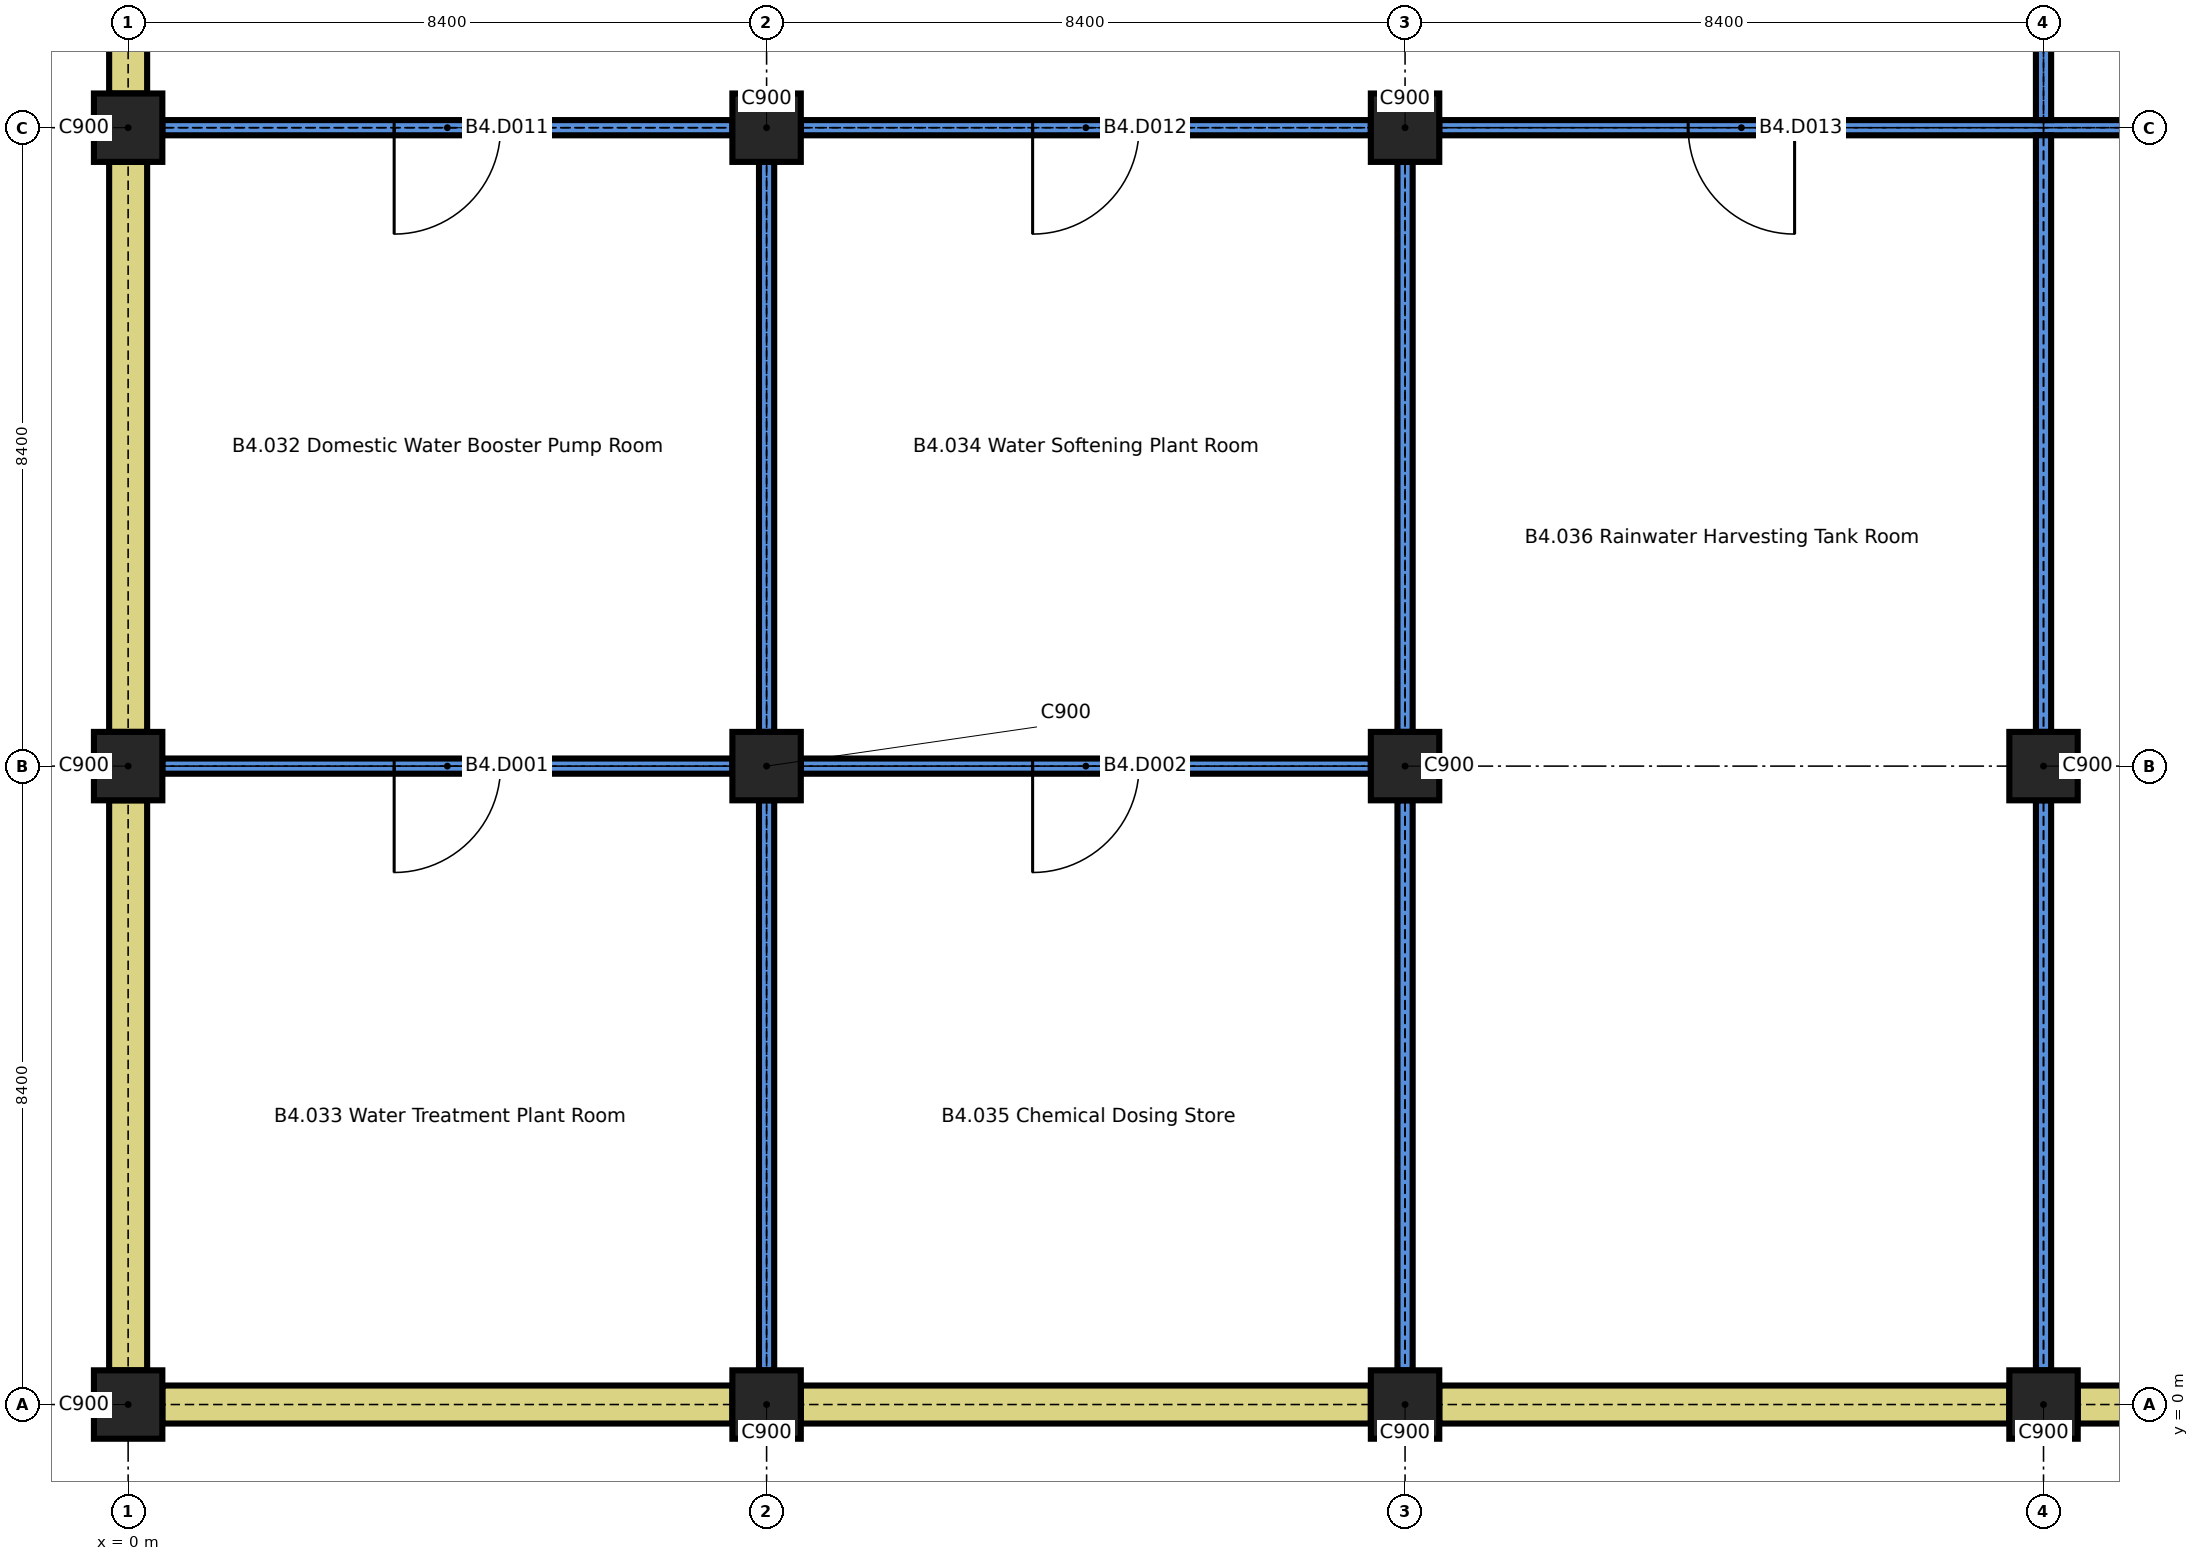
"""IFC4 building model, lengths in metres.
Left out: names, types, materials, properties, quantities, classifications, styles, units other than length and angle.
Written with IfcOpenShell. Run it as: python <this file> out.ifc"""

import sys

from ifc_helpers import new_model, si_unit, direction, frame, frame_2d, origin, origin_2d, place, context, subcontext, project, spatial, rectangle, extrude, element, fill, save


model = new_model("IFC4")
c1 = context("Model", 3, precision=1e-05, world=origin(), true_north=direction((0.0, 1.0)))
c2 = subcontext(c1, "Body", "Model", "MODEL_VIEW")
j1 = project(units=[si_unit("LENGTHUNIT", "METRE"), si_unit("PLANEANGLEUNIT", "RADIAN")], contexts=[c1])
p1 = place(None, origin())
s1 = spatial("IfcSite", under=j1, at=p1, CompositionType="ELEMENT")
p2 = place(p1, origin())
s2 = spatial("IfcBuilding", under=s1, at=p2, CompositionType="ELEMENT")
p3 = place(p2, frame((0.0, 0.0, -15.0)))
s3 = spatial("IfcBuildingStorey", under=s2, at=p3, CompositionType="ELEMENT", Elevation=-15.0)
for number, where, z_axis, x_axis in (
    (1, (0.0, 0.0, 0.0), (0.0, 0.0, 1.0), (1.0, 0.0, 0.0)),
    (2, (8.4, 0.0, 0.0), (0.0, 0.0, 1.0), (1.0, 0.0, 0.0)),
    (3, (16.8, 0.0, 0.0), (0.0, 0.0, 1.0), (1.0, 0.0, 0.0)),
    (4, (25.2, 0.0, 0.0), (0.0, 0.0, 1.0), (1.0, 0.0, 0.0)),
    (5, (0.0, 8.4, 0.0), (0.0, 0.0, 1.0), (1.0, 0.0, 0.0)),
    (6, (8.4, 8.4, 0.0), (0.0, 0.0, 1.0), (1.0, 0.0, 0.0)),
    (7, (16.8, 8.4, 0.0), (0.0, 0.0, 1.0), (1.0, 0.0, 0.0)),
    (8, (25.2, 8.4, 0.0), (0.0, 0.0, 1.0), (1.0, 0.0, 0.0)),
    (9, (0.0, 16.8, 0.0), (0.0, 0.0, 1.0), (1.0, 0.0, 0.0)),
    (10, (8.4, 16.8, 0.0), (0.0, 0.0, 1.0), (1.0, 0.0, 0.0)),
    (11, (16.8, 16.8, 0.0), (0.0, 0.0, 1.0), (1.0, 0.0, 0.0)),
):
    element("IfcColumn", number, at=place(p3, frame(where, z_axis=z_axis, x_axis=x_axis)), inside=s3, PredefinedType="COLUMN", context=c2, shape_type="SweptSolid", body=[
        extrude(rectangle(XDim=0.9, YDim=0.9, at=origin_2d()), origin(), (0.0, 0.0, 1.0), 3.2),
    ])
for number, where, z_axis, x_axis in (
    (12, (0.45, 0.0, 0.0), (0.0, 0.0, 1.0), (1.0, 0.0, 0.0)),
    (13, (8.85, 0.0, 0.0), (0.0, 0.0, 1.0), (1.0, 0.0, 0.0)),
    (14, (17.25, 0.0, 0.0), (0.0, 0.0, 1.0), (1.0, 0.0, 0.0)),
    (15, (25.65, 0.0, 0.0), (0.0, 0.0, 1.0), (1.0, 0.0, 0.0)),
    (16, (0.0, 0.45, 0.0), (0.0, 0.0, 1.0), (0.0, 1.0, 0.0)),
    (17, (0.0, 8.85, 0.0), (0.0, 0.0, 1.0), (0.0, 1.0, 0.0)),
):
    element("IfcWall", number, at=place(p3, frame(where, z_axis=z_axis, x_axis=x_axis)), inside=s3, PredefinedType="SOLIDWALL", context=c2, shape_type="SweptSolid", body=[
        extrude(rectangle(XDim=7.5, YDim=0.5, at=frame_2d((3.75, 0.0))), origin(), (0.0, 0.0, 1.0), 3.2),
    ])
p4 = place(p3, frame((0.0, 17.25, 0.0), z_axis=(0.0, 0.0, 1.0), x_axis=(0.0, 1.0, 0.0)))
e18 = element("IfcWall", 18, at=p4, inside=s3, PredefinedType="SOLIDWALL", context=c2, shape_type="SweptSolid", body=[
    extrude(rectangle(XDim=16.6, YDim=0.5, at=frame_2d((8.3, 0.0))), origin(), (0.0, 0.0, 1.0), 3.2),
])
p5 = place(p3, frame((0.45, 8.4, 0.0), z_axis=(0.0, 0.0, 1.0), x_axis=(1.0, 0.0, 0.0)))
e19 = element("IfcWall", 19, at=p5, inside=s3, PredefinedType="PARTITIONING", context=c2, shape_type="SweptSolid", body=[
    extrude(rectangle(XDim=7.5, YDim=0.2, at=frame_2d((3.75, 0.0))), origin(), (0.0, 0.0, 1.0), 3.2),
])
p6 = place(p5, frame((3.05, 0.0, 0.0)))
e20 = element("IfcOpeningElement", 20, at=p6, cuts=e19, PredefinedType="OPENING", context=c2, shape_type="SweptSolid", body=[
    extrude(rectangle(XDim=1.4, YDim=2.1, at=frame_2d((0.7, 1.05))), frame((0.0, 0.11, 0.0), z_axis=(0.0, -1.0, 0.0), x_axis=(1.0, 0.0, 0.0)), (0.0, 0.0, 1.0), 0.22),
])
p7 = place(p3, frame((8.85, 8.4, 0.0), z_axis=(0.0, 0.0, 1.0), x_axis=(1.0, 0.0, 0.0)))
e21 = element("IfcWall", 21, at=p7, inside=s3, PredefinedType="PARTITIONING", context=c2, shape_type="SweptSolid", body=[
    extrude(rectangle(XDim=7.5, YDim=0.2, at=frame_2d((3.75, 0.0))), origin(), (0.0, 0.0, 1.0), 3.2),
])
p8 = place(p7, frame((3.05, 0.0, 0.0)))
e22 = element("IfcOpeningElement", 22, at=p8, cuts=e21, PredefinedType="OPENING", context=c2, shape_type="SweptSolid", body=[
    extrude(rectangle(XDim=1.4, YDim=2.1, at=frame_2d((0.7, 1.05))), frame((0.0, 0.11, 0.0), z_axis=(0.0, -1.0, 0.0), x_axis=(1.0, 0.0, 0.0)), (0.0, 0.0, 1.0), 0.22),
])
p9 = place(p3, frame((0.45, 16.8, 0.0), z_axis=(0.0, 0.0, 1.0), x_axis=(1.0, 0.0, 0.0)))
e23 = element("IfcWall", 23, at=p9, inside=s3, PredefinedType="PARTITIONING", context=c2, shape_type="SweptSolid", body=[
    extrude(rectangle(XDim=7.5, YDim=0.2, at=frame_2d((3.75, 0.0))), origin(), (0.0, 0.0, 1.0), 3.2),
])
p10 = place(p9, frame((3.05, 0.0, 0.0)))
e24 = element("IfcOpeningElement", 24, at=p10, cuts=e23, PredefinedType="OPENING", context=c2, shape_type="SweptSolid", body=[
    extrude(rectangle(XDim=1.4, YDim=2.1, at=frame_2d((0.7, 1.05))), frame((0.0, 0.11, 0.0), z_axis=(0.0, -1.0, 0.0), x_axis=(1.0, 0.0, 0.0)), (0.0, 0.0, 1.0), 0.22),
])
p11 = place(p3, frame((8.85, 16.8, 0.0), z_axis=(0.0, 0.0, 1.0), x_axis=(1.0, 0.0, 0.0)))
e25 = element("IfcWall", 25, at=p11, inside=s3, PredefinedType="PARTITIONING", context=c2, shape_type="SweptSolid", body=[
    extrude(rectangle(XDim=7.5, YDim=0.2, at=frame_2d((3.75, 0.0))), origin(), (0.0, 0.0, 1.0), 3.2),
])
p12 = place(p11, frame((3.05, 0.0, 0.0)))
e26 = element("IfcOpeningElement", 26, at=p12, cuts=e25, PredefinedType="OPENING", context=c2, shape_type="SweptSolid", body=[
    extrude(rectangle(XDim=1.4, YDim=2.1, at=frame_2d((0.7, 1.05))), frame((0.0, 0.11, 0.0), z_axis=(0.0, -1.0, 0.0), x_axis=(1.0, 0.0, 0.0)), (0.0, 0.0, 1.0), 0.22),
])
p13 = place(p3, frame((17.25, 16.8, 0.0), z_axis=(0.0, 0.0, 1.0), x_axis=(1.0, 0.0, 0.0)))
e27 = element("IfcWall", 27, at=p13, inside=s3, PredefinedType="PARTITIONING", context=c2, shape_type="SweptSolid", body=[
    extrude(rectangle(XDim=15.9, YDim=0.2, at=frame_2d((7.95, 0.0))), origin(), (0.0, 0.0, 1.0), 3.2),
])
p14 = place(p13, frame((3.275, 0.0, 0.0)))
e28 = element("IfcOpeningElement", 28, at=p14, cuts=e27, PredefinedType="OPENING", context=c2, shape_type="SweptSolid", body=[
    extrude(rectangle(XDim=1.4, YDim=2.1, at=frame_2d((0.7, 1.05))), frame((0.0, 0.11, 0.0), z_axis=(0.0, -1.0, 0.0), x_axis=(1.0, 0.0, 0.0)), (0.0, 0.0, 1.0), 0.22),
])
p15 = place(p13, frame((13.325, 0.0, 0.0)))
e29 = element("IfcOpeningElement", 29, at=p15, cuts=e27, PredefinedType="OPENING", context=c2, shape_type="SweptSolid", body=[
    extrude(rectangle(XDim=1.4, YDim=2.1, at=frame_2d((0.7, 1.05))), frame((0.0, 0.11, 0.0), z_axis=(0.0, -1.0, 0.0), x_axis=(1.0, 0.0, 0.0)), (0.0, 0.0, 1.0), 0.22),
])
for number, where, z_axis, x_axis in (
    (30, (8.4, 0.45, 0.0), (0.0, 0.0, 1.0), (0.0, 1.0, 0.0)),
    (31, (8.4, 8.85, 0.0), (0.0, 0.0, 1.0), (0.0, 1.0, 0.0)),
    (32, (16.8, 0.45, 0.0), (0.0, 0.0, 1.0), (0.0, 1.0, 0.0)),
    (33, (16.8, 8.85, 0.0), (0.0, 0.0, 1.0), (0.0, 1.0, 0.0)),
    (34, (25.2, 0.45, 0.0), (0.0, 0.0, 1.0), (0.0, 1.0, 0.0)),
):
    element("IfcWall", number, at=place(p3, frame(where, z_axis=z_axis, x_axis=x_axis)), inside=s3, PredefinedType="PARTITIONING", context=c2, shape_type="SweptSolid", body=[
        extrude(rectangle(XDim=7.5, YDim=0.2, at=frame_2d((3.75, 0.0))), origin(), (0.0, 0.0, 1.0), 3.2),
    ])
p16 = place(p3, frame((25.2, 8.85, 0.0), z_axis=(0.0, 0.0, 1.0), x_axis=(0.0, 1.0, 0.0)))
e35 = element("IfcWall", 35, at=p16, inside=s3, PredefinedType="PARTITIONING", context=c2, shape_type="SweptSolid", body=[
    extrude(rectangle(XDim=7.85, YDim=0.2, at=frame_2d((3.925, 0.0))), origin(), (0.0, 0.0, 1.0), 3.2),
])
p17 = place(p3, frame((25.2, 16.9, 0.0), z_axis=(0.0, 0.0, 1.0), x_axis=(0.0, 1.0, 0.0)))
e36 = element("IfcWall", 36, at=p17, inside=s3, PredefinedType="PARTITIONING", context=c2, shape_type="SweptSolid", body=[
    extrude(rectangle(XDim=4.5, YDim=0.2, at=frame_2d((2.25, 0.0))), origin(), (0.0, 0.0, 1.0), 3.2),
])
p18 = place(p17, frame((1.25, 0.0, 0.0)))
e37 = element("IfcOpeningElement", 37, at=p18, cuts=e36, PredefinedType="OPENING", context=c2, shape_type="SweptSolid", body=[
    extrude(rectangle(XDim=2.0, YDim=2.4, at=frame_2d((1.0, 1.2))), frame((0.0, 0.11, 0.0), z_axis=(0.0, -1.0, 0.0), x_axis=(1.0, 0.0, 0.0)), (0.0, 0.0, 1.0), 0.22),
])
p19 = place(p6, origin())
e38 = element("IfcDoor", 38, at=p19, inside=s3, OperationType="SINGLE_SWING_LEFT", PredefinedType="DOOR", context=c2, shape_type="SweptSolid", body=[
    extrude(rectangle(XDim=1.4, YDim=2.1, at=frame_2d((0.7, 1.05))), frame((0.0, 0.025, 0.0), z_axis=(0.0, -1.0, 0.0), x_axis=(1.0, 0.0, 0.0)), (0.0, 0.0, 1.0), 0.05),
])
fill(e20, e38)
p20 = place(p8, origin())
e39 = element("IfcDoor", 39, at=p20, inside=s3, OperationType="SINGLE_SWING_LEFT", PredefinedType="DOOR", context=c2, shape_type="SweptSolid", body=[
    extrude(rectangle(XDim=1.4, YDim=2.1, at=frame_2d((0.7, 1.05))), frame((0.0, 0.025, 0.0), z_axis=(0.0, -1.0, 0.0), x_axis=(1.0, 0.0, 0.0)), (0.0, 0.0, 1.0), 0.05),
])
fill(e22, e39)
p21 = place(p10, origin())
e40 = element("IfcDoor", 40, at=p21, inside=s3, OperationType="SINGLE_SWING_LEFT", PredefinedType="DOOR", context=c2, shape_type="SweptSolid", body=[
    extrude(rectangle(XDim=1.4, YDim=2.1, at=frame_2d((0.7, 1.05))), frame((0.0, 0.025, 0.0), z_axis=(0.0, -1.0, 0.0), x_axis=(1.0, 0.0, 0.0)), (0.0, 0.0, 1.0), 0.05),
])
fill(e24, e40)
p22 = place(p12, origin())
e41 = element("IfcDoor", 41, at=p22, inside=s3, OperationType="SINGLE_SWING_LEFT", PredefinedType="DOOR", context=c2, shape_type="SweptSolid", body=[
    extrude(rectangle(XDim=1.4, YDim=2.1, at=frame_2d((0.7, 1.05))), frame((0.0, 0.025, 0.0), z_axis=(0.0, -1.0, 0.0), x_axis=(1.0, 0.0, 0.0)), (0.0, 0.0, 1.0), 0.05),
])
fill(e26, e41)
p23 = place(p14, origin())
e42 = element("IfcDoor", 42, at=p23, inside=s3, OperationType="SINGLE_SWING_RIGHT", PredefinedType="DOOR", context=c2, shape_type="SweptSolid", body=[
    extrude(rectangle(XDim=1.4, YDim=2.1, at=frame_2d((0.7, 1.05))), frame((0.0, 0.025, 0.0), z_axis=(0.0, -1.0, 0.0), x_axis=(1.0, 0.0, 0.0)), (0.0, 0.0, 1.0), 0.05),
])
fill(e28, e42)
save(model, sys.argv[1])
